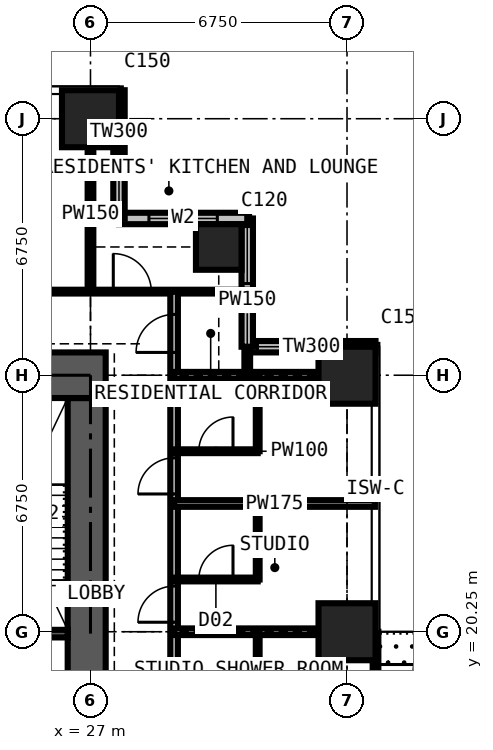
"""IFC4 building model, lengths in metres.
Left out: names, types, materials, properties, quantities, classifications, styles, units other than length and angle.
Written with IfcOpenShell. Run it as: python <this file> out.ifc"""

import sys

from ifc_helpers import new_model, si_unit, direction, frame, frame_2d, origin, origin_2d, place, context, subcontext, project, spatial, rectangle, extrude, element, fill, save


model = new_model("IFC4")
c1 = context("Model", 3, precision=1e-05, world=origin(), true_north=direction((0.0, 1.0)))
c2 = subcontext(c1, "Body", "Model", "MODEL_VIEW")
j1 = project(units=[si_unit("LENGTHUNIT", "METRE"), si_unit("PLANEANGLEUNIT", "RADIAN")], contexts=[c1])
p1 = place(None, origin())
s1 = spatial("IfcSite", under=j1, at=p1, CompositionType="ELEMENT")
p2 = place(p1, origin())
s2 = spatial("IfcBuilding", under=s1, at=p2, CompositionType="ELEMENT")
p3 = place(p2, frame((0.0, 0.0, 163.8)))
s3 = spatial("IfcBuildingStorey", under=s2, at=p3, CompositionType="ELEMENT", Elevation=163.8)
p4 = place(p3, frame((27.0, 33.75, 0.0), z_axis=(0.0, 0.0, 1.0), x_axis=(1.0, 0.0, 0.0)))
e1 = element("IfcColumn", 1, at=p4, inside=s3, PredefinedType="COLUMN", context=c2, shape_type="SweptSolid", body=[
    extrude(rectangle(XDim=1.5, YDim=1.5, at=origin_2d()), origin(), (0.0, 0.0, 1.0), 3.6),
])
p5 = place(p3, frame((30.375, 30.375, 0.0), z_axis=(0.0, 0.0, 1.0), x_axis=(1.0, 0.0, 0.0)))
e2 = element("IfcColumn", 2, at=p5, inside=s3, PredefinedType="COLUMN", context=c2, shape_type="SweptSolid", body=[
    extrude(rectangle(XDim=1.2, YDim=1.2, at=origin_2d()), origin(), (0.0, 0.0, 1.0), 3.6),
])
for number, where, z_axis, x_axis in (
    (3, (33.75, 20.25, 0.0), (0.0, 0.0, 1.0), (1.0, 0.0, 0.0)),
    (4, (33.75, 27.0, 0.0), (0.0, 0.0, 1.0), (1.0, 0.0, 0.0)),
):
    element("IfcColumn", number, at=place(p3, frame(where, z_axis=z_axis, x_axis=x_axis)), inside=s3, PredefinedType="COLUMN", context=c2, shape_type="SweptSolid", body=[
        extrude(rectangle(XDim=1.5, YDim=1.5, at=origin_2d()), origin(), (0.0, 0.0, 1.0), 3.6),
    ])
p6 = place(p3, frame((26.9, 14.1, 0.0), z_axis=(0.0, 0.0, 1.0), x_axis=(0.0, 1.0, 0.0)))
e5 = element("IfcWall", 5, at=p6, inside=s3, PredefinedType="SHEAR", context=c2, shape_type="SweptSolid", body=[
    extrude(rectangle(XDim=12.3, YDim=1.0, at=frame_2d((6.15, 0.0))), origin(), (0.0, 0.0, 1.0), 3.6),
])
p7 = place(p6, frame((3.65, 0.0, 0.0)))
e6 = element("IfcOpeningElement", 6, at=p7, cuts=e5, PredefinedType="OPENING", context=c2, shape_type="SweptSolid", body=[
    extrude(rectangle(XDim=1.2, YDim=2.2, at=frame_2d((0.6, 1.1))), frame((0.0, 0.51, 0.0), z_axis=(0.0, -1.0, 0.0), x_axis=(1.0, 0.0, 0.0)), (0.0, 0.0, 1.0), 1.02),
])
p8 = place(p3, frame((27.4, 27.0, 0.0), z_axis=(0.0, 0.0, 1.0), x_axis=(-1.0, 0.0, 0.0)))
e7 = element("IfcWall", 7, at=p8, inside=s3, PredefinedType="SHEAR", context=c2, shape_type="SweptSolid", body=[
    extrude(rectangle(XDim=14.3, YDim=1.2, at=frame_2d((7.15, 0.0))), origin(), (0.0, 0.0, 1.0), 3.6),
])
p9 = place(p8, frame((4.55, 0.0, 0.0)))
e8 = element("IfcOpeningElement", 8, at=p9, cuts=e7, PredefinedType="OPENING", context=c2, shape_type="SweptSolid", body=[
    extrude(rectangle(XDim=0.9, YDim=2.2, at=frame_2d((0.45, 1.1))), frame((0.0, 0.61, 0.0), z_axis=(0.0, -1.0, 0.0), x_axis=(1.0, 0.0, 0.0)), (0.0, 0.0, 1.0), 1.22),
])
p10 = place(p8, frame((7.525, 0.0, 0.0)))
e9 = element("IfcOpeningElement", 9, at=p10, cuts=e7, PredefinedType="OPENING", context=c2, shape_type="SweptSolid", body=[
    extrude(rectangle(XDim=1.0, YDim=2.2, at=frame_2d((0.5, 1.1))), frame((0.0, 0.61, 0.0), z_axis=(0.0, -1.0, 0.0), x_axis=(1.0, 0.0, 0.0)), (0.0, 0.0, 1.0), 1.22),
])
p11 = place(p3, frame((34.5, 20.25, 0.0), z_axis=(0.0, 0.0, 1.0), x_axis=(0.0, -1.0, 0.0)))
e10 = element("IfcWall", 10, at=p11, inside=s3, PredefinedType="SOLIDWALL", context=c2, shape_type="SweptSolid", body=[
    extrude(rectangle(XDim=6.75, YDim=0.15, at=frame_2d((3.375, 0.0))), origin(), (0.0, 0.0, 1.0), 3.375),
])
p12 = place(p11, frame((0.863, 0.0, 0.0)))
e11 = element("IfcOpeningElement", 11, at=p12, cuts=e10, PredefinedType="OPENING", context=c2, shape_type="SweptSolid", body=[
    extrude(rectangle(XDim=1.0, YDim=2.2, at=frame_2d((0.5, 1.1))), frame((0.0, 0.085, 0.0), z_axis=(0.0, -1.0, 0.0), x_axis=(1.0, 0.0, 0.0)), (0.0, 0.0, 1.0), 0.17),
])
p13 = place(p11, frame((1.975, 0.0, 0.9)))
e12 = element("IfcOpeningElement", 12, at=p13, cuts=e10, PredefinedType="OPENING", context=c2, shape_type="SweptSolid", body=[
    extrude(rectangle(XDim=1.2, YDim=1.8, at=frame_2d((0.6, 0.9))), frame((0.0, 0.085, 0.0), z_axis=(0.0, -1.0, 0.0), x_axis=(1.0, 0.0, 0.0)), (0.0, 0.0, 1.0), 0.17),
])
p14 = place(p11, frame((4.887, 0.0, 0.0)))
e13 = element("IfcOpeningElement", 13, at=p14, cuts=e10, PredefinedType="OPENING", context=c2, shape_type="SweptSolid", body=[
    extrude(rectangle(XDim=1.0, YDim=2.2, at=frame_2d((0.5, 1.1))), frame((0.0, 0.085, 0.0), z_axis=(0.0, -1.0, 0.0), x_axis=(1.0, 0.0, 0.0)), (0.0, 0.0, 1.0), 0.17),
])
p15 = place(p11, frame((3.575, 0.0, 0.9)))
e14 = element("IfcOpeningElement", 14, at=p15, cuts=e10, PredefinedType="OPENING", context=c2, shape_type="SweptSolid", body=[
    extrude(rectangle(XDim=1.2, YDim=1.8, at=frame_2d((0.6, 0.9))), frame((0.0, 0.085, 0.0), z_axis=(0.0, -1.0, 0.0), x_axis=(1.0, 0.0, 0.0)), (0.0, 0.0, 1.0), 0.17),
])
p16 = place(p3, frame((34.5, 27.75, 0.0), z_axis=(0.0, 0.0, 1.0), x_axis=(-1.0, 0.0, 0.0)))
e15 = element("IfcWall", 15, at=p16, inside=s3, PredefinedType="SOLIDWALL", context=c2, shape_type="SweptSolid", body=[
    extrude(rectangle(XDim=3.375, YDim=0.3, at=frame_2d((1.688, 0.0))), origin(), (0.0, 0.0, 1.0), 3.375),
])
p17 = place(p16, frame((1.607, 0.0, 0.9)))
e16 = element("IfcOpeningElement", 16, at=p17, cuts=e15, PredefinedType="OPENING", context=c2, shape_type="SweptSolid", body=[
    extrude(rectangle(XDim=1.5, YDim=1.8, at=frame_2d((0.75, 0.9))), frame((0.0, 0.16, 0.0), z_axis=(0.0, -1.0, 0.0), x_axis=(1.0, 0.0, 0.0)), (0.0, 0.0, 1.0), 0.32),
])
p18 = place(p3, frame((31.125, 27.75, 0.0), z_axis=(0.0, 0.0, 1.0), x_axis=(0.0, 1.0, 0.0)))
e17 = element("IfcWall", 17, at=p18, inside=s3, PredefinedType="SOLIDWALL", context=c2, shape_type="SweptSolid", body=[
    extrude(rectangle(XDim=3.375, YDim=0.3, at=frame_2d((1.688, 0.0))), origin(), (0.0, 0.0, 1.0), 3.375),
])
p19 = place(p18, frame((1.663, 0.0, 0.9)))
e18 = element("IfcOpeningElement", 18, at=p19, cuts=e17, PredefinedType="OPENING", context=c2, shape_type="SweptSolid", body=[
    extrude(rectangle(XDim=1.5, YDim=1.8, at=frame_2d((0.75, 0.9))), frame((0.0, 0.16, 0.0), z_axis=(0.0, -1.0, 0.0), x_axis=(1.0, 0.0, 0.0)), (0.0, 0.0, 1.0), 0.32),
])
p20 = place(p3, frame((31.125, 31.125, 0.0), z_axis=(0.0, 0.0, 1.0), x_axis=(-1.0, 0.0, 0.0)))
e19 = element("IfcWall", 19, at=p20, inside=s3, PredefinedType="SOLIDWALL", context=c2, shape_type="SweptSolid", body=[
    extrude(rectangle(XDim=3.375, YDim=0.3, at=frame_2d((1.688, 0.0))), origin(), (0.0, 0.0, 1.0), 3.375),
])
p21 = place(p20, frame((0.788, 0.0, 0.6)))
e20 = element("IfcOpeningElement", 20, at=p21, cuts=e19, PredefinedType="OPENING", context=c2, shape_type="SweptSolid", body=[
    extrude(rectangle(XDim=1.8, YDim=2.1, at=frame_2d((0.9, 1.05))), frame((0.0, 0.16, 0.0), z_axis=(0.0, -1.0, 0.0), x_axis=(1.0, 0.0, 0.0)), (0.0, 0.0, 1.0), 0.32),
])
p22 = place(p3, frame((27.75, 31.125, 0.0), z_axis=(0.0, 0.0, 1.0), x_axis=(0.0, 1.0, 0.0)))
e21 = element("IfcWall", 21, at=p22, inside=s3, PredefinedType="SOLIDWALL", context=c2, shape_type="SweptSolid", body=[
    extrude(rectangle(XDim=3.375, YDim=0.3, at=frame_2d((1.688, 0.0))), origin(), (0.0, 0.0, 1.0), 3.375),
])
p23 = place(p22, frame((0.268, 0.0, 0.9)))
e22 = element("IfcOpeningElement", 22, at=p23, cuts=e21, PredefinedType="OPENING", context=c2, shape_type="SweptSolid", body=[
    extrude(rectangle(XDim=1.5, YDim=1.8, at=frame_2d((0.75, 0.9))), frame((0.0, 0.16, 0.0), z_axis=(0.0, -1.0, 0.0), x_axis=(1.0, 0.0, 0.0)), (0.0, 0.0, 1.0), 0.32),
])
p24 = place(p3, frame((14.1, 20.2, 0.0), z_axis=(0.0, 0.0, 1.0), x_axis=(1.0, 0.0, 0.0)))
e23 = element("IfcWall", 23, at=p24, inside=s3, PredefinedType="SHEAR", context=c2, shape_type="SweptSolid", body=[
    extrude(rectangle(XDim=12.3, YDim=0.2, at=frame_2d((6.15, 0.0))), origin(), (0.0, 0.0, 1.0), 3.6),
])
p25 = place(p24, frame((4.56, 0.0, 0.0)))
e24 = element("IfcOpeningElement", 24, at=p25, cuts=e23, PredefinedType="OPENING", context=c2, shape_type="SweptSolid", body=[
    extrude(rectangle(XDim=1.1, YDim=2.2, at=frame_2d((0.55, 1.1))), frame((0.0, 0.11, 0.0), z_axis=(0.0, -1.0, 0.0), x_axis=(1.0, 0.0, 0.0)), (0.0, 0.0, 1.0), 0.22),
])
p26 = place(p24, frame((6.7, 0.0, 0.0)))
e25 = element("IfcOpeningElement", 25, at=p26, cuts=e23, PredefinedType="OPENING", context=c2, shape_type="SweptSolid", body=[
    extrude(rectangle(XDim=1.1, YDim=2.2, at=frame_2d((0.55, 1.1))), frame((0.0, 0.11, 0.0), z_axis=(0.0, -1.0, 0.0), x_axis=(1.0, 0.0, 0.0)), (0.0, 0.0, 1.0), 0.22),
])
p27 = place(p24, frame((0.35, 0.0, 0.0)))
e26 = element("IfcOpeningElement", 26, at=p27, cuts=e23, PredefinedType="OPENING", context=c2, shape_type="SweptSolid", body=[
    extrude(rectangle(XDim=1.1, YDim=2.2, at=frame_2d((0.55, 1.1))), frame((0.0, 0.11, 0.0), z_axis=(0.0, -1.0, 0.0), x_axis=(1.0, 0.0, 0.0)), (0.0, 0.0, 1.0), 0.22),
])
p28 = place(p24, frame((9.75, 0.0, 0.0)))
e27 = element("IfcOpeningElement", 27, at=p28, cuts=e23, PredefinedType="OPENING", context=c2, shape_type="SweptSolid", body=[
    extrude(rectangle(XDim=1.1, YDim=2.2, at=frame_2d((0.55, 1.1))), frame((0.0, 0.11, 0.0), z_axis=(0.0, -1.0, 0.0), x_axis=(1.0, 0.0, 0.0)), (0.0, 0.0, 1.0), 0.22),
])
p29 = place(p3, frame((11.3, 29.2, 0.0), z_axis=(0.0, 0.0, 1.0), x_axis=(1.0, 0.0, 0.0)))
e28 = element("IfcWall", 28, at=p29, inside=s3, PredefinedType="PARTITIONING", context=c2, shape_type="SweptSolid", body=[
    extrude(rectangle(XDim=19.809, YDim=0.1, at=frame_2d((9.904, 0.0))), origin(), (0.0, 0.0, 1.0), 3.375),
])
p30 = place(p29, frame((16.3, 0.0, 0.0)))
e29 = element("IfcOpeningElement", 29, at=p30, cuts=e28, PredefinedType="OPENING", context=c2, shape_type="SweptSolid", body=[
    extrude(rectangle(XDim=1.0, YDim=2.2, at=frame_2d((0.5, 1.1))), frame((0.0, 0.06, 0.0), z_axis=(0.0, -1.0, 0.0), x_axis=(1.0, 0.0, 0.0)), (0.0, 0.0, 1.0), 0.12),
])
p31 = place(p29, frame((6.4, 0.0, 0.0)))
e30 = element("IfcOpeningElement", 30, at=p31, cuts=e28, PredefinedType="OPENING", context=c2, shape_type="SweptSolid", body=[
    extrude(rectangle(XDim=0.95, YDim=2.2, at=frame_2d((0.475, 1.1))), frame((0.0, 0.06, 0.0), z_axis=(0.0, -1.0, 0.0), x_axis=(1.0, 0.0, 0.0)), (0.0, 0.0, 1.0), 0.12),
])
p32 = place(p29, frame((13.15, 0.0, 0.0)))
e31 = element("IfcOpeningElement", 31, at=p32, cuts=e28, PredefinedType="OPENING", context=c2, shape_type="SweptSolid", body=[
    extrude(rectangle(XDim=0.95, YDim=2.2, at=frame_2d((0.475, 1.1))), frame((0.0, 0.06, 0.0), z_axis=(0.0, -1.0, 0.0), x_axis=(1.0, 0.0, 0.0)), (0.0, 0.0, 1.0), 0.12),
])
p33 = place(p29, frame((0.6, 0.0, 0.0)))
e32 = element("IfcOpeningElement", 32, at=p33, cuts=e28, PredefinedType="OPENING", context=c2, shape_type="SweptSolid", body=[
    extrude(rectangle(XDim=1.0, YDim=2.2, at=frame_2d((0.5, 1.1))), frame((0.0, 0.06, 0.0), z_axis=(0.0, -1.0, 0.0), x_axis=(1.0, 0.0, 0.0)), (0.0, 0.0, 1.0), 0.12),
])
p34 = place(p3, frame((27.0, 29.2, 0.0), z_axis=(0.0, 0.0, 1.0), x_axis=(0.0, 1.0, 0.0)))
e33 = element("IfcWall", 33, at=p34, inside=s3, PredefinedType="PARTITIONING", context=c2, shape_type="SweptSolid", body=[
    extrude(rectangle(XDim=5.284, YDim=0.15, at=frame_2d((2.642, 0.0))), origin(), (0.0, 0.0, 1.0), 2.806),
])
p35 = place(p3, frame((29.2, 13.5, 0.0), z_axis=(0.0, 0.0, 1.0), x_axis=(0.0, 1.0, 0.0)))
e34 = element("IfcWall", 34, at=p35, inside=s3, PredefinedType="PARTITIONING", context=c2, shape_type="SweptSolid", body=[
    extrude(rectangle(XDim=15.7, YDim=0.2, at=frame_2d((7.85, 0.0))), origin(), (0.0, 0.0, 1.0), 3.375),
])
p36 = place(p35, frame((3.625, 0.0, 0.0)))
e35 = element("IfcOpeningElement", 35, at=p36, cuts=e34, PredefinedType="OPENING", context=c2, shape_type="SweptSolid", body=[
    extrude(rectangle(XDim=0.95, YDim=2.2, at=frame_2d((0.475, 1.1))), frame((0.0, 0.11, 0.0), z_axis=(0.0, -1.0, 0.0), x_axis=(1.0, 0.0, 0.0)), (0.0, 0.0, 1.0), 0.22),
])
p37 = place(p35, frame((7.0, 0.0, 0.0)))
e36 = element("IfcOpeningElement", 36, at=p37, cuts=e34, PredefinedType="OPENING", context=c2, shape_type="SweptSolid", body=[
    extrude(rectangle(XDim=0.95, YDim=2.2, at=frame_2d((0.475, 1.1))), frame((0.0, 0.11, 0.0), z_axis=(0.0, -1.0, 0.0), x_axis=(1.0, 0.0, 0.0)), (0.0, 0.0, 1.0), 0.22),
])
p38 = place(p35, frame((10.375, 0.0, 0.0)))
e37 = element("IfcOpeningElement", 37, at=p38, cuts=e34, PredefinedType="OPENING", context=c2, shape_type="SweptSolid", body=[
    extrude(rectangle(XDim=0.95, YDim=2.2, at=frame_2d((0.475, 1.1))), frame((0.0, 0.11, 0.0), z_axis=(0.0, -1.0, 0.0), x_axis=(1.0, 0.0, 0.0)), (0.0, 0.0, 1.0), 0.22),
])
p39 = place(p35, frame((14.1, 0.0, 0.0)))
e38 = element("IfcOpeningElement", 38, at=p39, cuts=e34, PredefinedType="OPENING", context=c2, shape_type="SweptSolid", body=[
    extrude(rectangle(XDim=1.0, YDim=2.2, at=frame_2d((0.5, 1.1))), frame((0.0, 0.11, 0.0), z_axis=(0.0, -1.0, 0.0), x_axis=(1.0, 0.0, 0.0)), (0.0, 0.0, 1.0), 0.22),
])
p40 = place(p3, frame((29.2, 20.25, 0.0), z_axis=(0.0, 0.0, 1.0), x_axis=(1.0, 0.0, 0.0)))
e39 = element("IfcWall", 39, at=p40, inside=s3, PredefinedType="PARTITIONING", context=c2, shape_type="SweptSolid", body=[
    extrude(rectangle(XDim=5.284, YDim=0.175, at=frame_2d((2.642, 0.0))), origin(), (0.0, 0.0, 1.0), 2.806),
])
p41 = place(p3, frame((29.2, 21.625, 0.0), z_axis=(0.0, 0.0, 1.0), x_axis=(1.0, 0.0, 0.0)))
e40 = element("IfcWall", 40, at=p41, inside=s3, PredefinedType="PARTITIONING", context=c2, shape_type="SweptSolid", body=[
    extrude(rectangle(XDim=2.2, YDim=0.1, at=frame_2d((1.1, 0.0))), origin(), (0.0, 0.0, 1.0), 3.375),
])
p42 = place(p41, frame((0.65, 0.0, 0.0)))
e41 = element("IfcOpeningElement", 41, at=p42, cuts=e40, PredefinedType="OPENING", context=c2, shape_type="SweptSolid", body=[
    extrude(rectangle(XDim=0.9, YDim=2.2, at=frame_2d((0.45, 1.1))), frame((0.0, 0.06, 0.0), z_axis=(0.0, -1.0, 0.0), x_axis=(1.0, 0.0, 0.0)), (0.0, 0.0, 1.0), 0.12),
])
p43 = place(p3, frame((29.2, 23.625, 0.0), z_axis=(0.0, 0.0, 1.0), x_axis=(1.0, 0.0, 0.0)))
e42 = element("IfcWall", 42, at=p43, inside=s3, PredefinedType="PARTITIONING", context=c2, shape_type="SweptSolid", body=[
    extrude(rectangle(XDim=5.284, YDim=0.175, at=frame_2d((2.642, 0.0))), origin(), (0.0, 0.0, 1.0), 3.375),
])
p44 = place(p3, frame((29.2, 25.0, 0.0), z_axis=(0.0, 0.0, 1.0), x_axis=(1.0, 0.0, 0.0)))
e43 = element("IfcWall", 43, at=p44, inside=s3, PredefinedType="PARTITIONING", context=c2, shape_type="SweptSolid", body=[
    extrude(rectangle(XDim=2.2, YDim=0.1, at=frame_2d((1.1, 0.0))), origin(), (0.0, 0.0, 1.0), 3.375),
])
p45 = place(p44, frame((0.65, 0.0, 0.0)))
e44 = element("IfcOpeningElement", 44, at=p45, cuts=e43, PredefinedType="OPENING", context=c2, shape_type="SweptSolid", body=[
    extrude(rectangle(XDim=0.9, YDim=2.2, at=frame_2d((0.45, 1.1))), frame((0.0, 0.06, 0.0), z_axis=(0.0, -1.0, 0.0), x_axis=(1.0, 0.0, 0.0)), (0.0, 0.0, 1.0), 0.12),
])
p46 = place(p3, frame((29.2, 27.0, 0.0), z_axis=(0.0, 0.0, 1.0), x_axis=(1.0, 0.0, 0.0)))
e45 = element("IfcWall", 45, at=p46, inside=s3, PredefinedType="PARTITIONING", context=c2, shape_type="SweptSolid", body=[
    extrude(rectangle(XDim=5.284, YDim=0.175, at=frame_2d((2.642, 0.0))), origin(), (0.0, 0.0, 1.0), 2.806),
])
p47 = place(p3, frame((31.125, 27.0, 0.0), z_axis=(0.0, 0.0, 1.0), x_axis=(0.0, 1.0, 0.0)))
e46 = element("IfcWall", 46, at=p47, inside=s3, PredefinedType="PARTITIONING", context=c2, shape_type="SweptSolid", body=[
    extrude(rectangle(XDim=0.734, YDim=0.15, at=frame_2d((0.367, 0.0))), origin(), (0.0, 0.0, 1.0), 3.375),
])
for number, where, z_axis, x_axis in (
    (47, (31.4, 18.25, 0.0), (0.0, 0.0, 1.0), (0.0, 1.0, 0.0)),
    (48, (31.4, 21.625, 0.0), (0.0, 0.0, 1.0), (0.0, 1.0, 0.0)),
    (49, (31.4, 25.0, 0.0), (0.0, 0.0, 1.0), (0.0, 1.0, 0.0)),
):
    element("IfcWall", number, at=place(p3, frame(where, z_axis=z_axis, x_axis=x_axis)), inside=s3, PredefinedType="PARTITIONING", context=c2, shape_type="SweptSolid", body=[
        extrude(rectangle(XDim=2.0, YDim=0.1, at=frame_2d((1.0, 0.0))), origin(), (0.0, 0.0, 1.0), 3.375),
    ])
p48 = place(p12, origin())
e50 = element("IfcDoor", 50, at=p48, inside=s3, OperationType="SINGLE_SWING_LEFT", PredefinedType="DOOR", context=c2, shape_type="SweptSolid", body=[
    extrude(rectangle(XDim=1.0, YDim=2.2, at=frame_2d((0.5, 1.1))), frame((0.0, 0.025, 0.0), z_axis=(0.0, -1.0, 0.0), x_axis=(1.0, 0.0, 0.0)), (0.0, 0.0, 1.0), 0.05),
])
fill(e11, e50)
p49 = place(p17, origin())
e51 = element("IfcWindow", 51, at=p49, inside=s3, PartitioningType="SINGLE_PANEL", PredefinedType="WINDOW", context=c2, shape_type="SweptSolid", body=[
    extrude(rectangle(XDim=1.5, YDim=1.8, at=frame_2d((0.75, 0.9))), frame((0.0, 0.03, 0.0), z_axis=(0.0, -1.0, 0.0), x_axis=(1.0, 0.0, 0.0)), (0.0, 0.0, 1.0), 0.06),
])
fill(e16, e51)
p50 = place(p19, origin())
e52 = element("IfcWindow", 52, at=p50, inside=s3, PartitioningType="SINGLE_PANEL", PredefinedType="WINDOW", context=c2, shape_type="SweptSolid", body=[
    extrude(rectangle(XDim=1.5, YDim=1.8, at=frame_2d((0.75, 0.9))), frame((0.0, 0.03, 0.0), z_axis=(0.0, -1.0, 0.0), x_axis=(1.0, 0.0, 0.0)), (0.0, 0.0, 1.0), 0.06),
])
fill(e18, e52)
p51 = place(p21, origin())
e53 = element("IfcWindow", 53, at=p51, inside=s3, PartitioningType="SINGLE_PANEL", PredefinedType="WINDOW", context=c2, shape_type="SweptSolid", body=[
    extrude(rectangle(XDim=1.8, YDim=2.1, at=frame_2d((0.9, 1.05))), frame((0.0, 0.03, 0.0), z_axis=(0.0, -1.0, 0.0), x_axis=(1.0, 0.0, 0.0)), (0.0, 0.0, 1.0), 0.06),
])
fill(e20, e53)
p52 = place(p23, origin())
e54 = element("IfcWindow", 54, at=p52, inside=s3, PartitioningType="SINGLE_PANEL", PredefinedType="WINDOW", context=c2, shape_type="SweptSolid", body=[
    extrude(rectangle(XDim=1.5, YDim=1.8, at=frame_2d((0.75, 0.9))), frame((0.0, 0.03, 0.0), z_axis=(0.0, -1.0, 0.0), x_axis=(1.0, 0.0, 0.0)), (0.0, 0.0, 1.0), 0.06),
])
fill(e22, e54)
p53 = place(p37, origin())
e55 = element("IfcDoor", 55, at=p53, inside=s3, OperationType="SINGLE_SWING_LEFT", PredefinedType="DOOR", context=c2, shape_type="SweptSolid", body=[
    extrude(rectangle(XDim=0.95, YDim=2.2, at=frame_2d((0.475, 1.1))), frame((0.0, 0.025, 0.0), z_axis=(0.0, -1.0, 0.0), x_axis=(1.0, 0.0, 0.0)), (0.0, 0.0, 1.0), 0.05),
])
fill(e36, e55)
p54 = place(p42, origin())
e56 = element("IfcDoor", 56, at=p54, inside=s3, OperationType="SINGLE_SWING_RIGHT", PredefinedType="DOOR", context=c2, shape_type="SweptSolid", body=[
    extrude(rectangle(XDim=0.9, YDim=2.2, at=frame_2d((0.45, 1.1))), frame((0.0, 0.025, 0.0), z_axis=(0.0, -1.0, 0.0), x_axis=(1.0, 0.0, 0.0)), (0.0, 0.0, 1.0), 0.05),
])
fill(e41, e56)
p55 = place(p38, origin())
e57 = element("IfcDoor", 57, at=p55, inside=s3, OperationType="SINGLE_SWING_LEFT", PredefinedType="DOOR", context=c2, shape_type="SweptSolid", body=[
    extrude(rectangle(XDim=0.95, YDim=2.2, at=frame_2d((0.475, 1.1))), frame((0.0, 0.025, 0.0), z_axis=(0.0, -1.0, 0.0), x_axis=(1.0, 0.0, 0.0)), (0.0, 0.0, 1.0), 0.05),
])
fill(e37, e57)
p56 = place(p45, origin())
e58 = element("IfcDoor", 58, at=p56, inside=s3, OperationType="SINGLE_SWING_RIGHT", PredefinedType="DOOR", context=c2, shape_type="SweptSolid", body=[
    extrude(rectangle(XDim=0.9, YDim=2.2, at=frame_2d((0.45, 1.1))), frame((0.0, 0.025, 0.0), z_axis=(0.0, -1.0, 0.0), x_axis=(1.0, 0.0, 0.0)), (0.0, 0.0, 1.0), 0.05),
])
fill(e44, e58)
p57 = place(p39, origin())
e59 = element("IfcDoor", 59, at=p57, inside=s3, OperationType="SINGLE_SWING_LEFT", PredefinedType="DOOR", context=c2, shape_type="SweptSolid", body=[
    extrude(rectangle(XDim=1.0, YDim=2.2, at=frame_2d((0.5, 1.1))), frame((0.0, 0.025, 0.0), z_axis=(0.0, -1.0, 0.0), x_axis=(1.0, 0.0, 0.0)), (0.0, 0.0, 1.0), 0.05),
])
fill(e38, e59)
p58 = place(p30, origin())
e60 = element("IfcDoor", 60, at=p58, inside=s3, OperationType="SINGLE_SWING_LEFT", PredefinedType="DOOR", context=c2, shape_type="SweptSolid", body=[
    extrude(rectangle(XDim=1.0, YDim=2.2, at=frame_2d((0.5, 1.1))), frame((0.0, 0.025, 0.0), z_axis=(0.0, -1.0, 0.0), x_axis=(1.0, 0.0, 0.0)), (0.0, 0.0, 1.0), 0.05),
])
fill(e29, e60)
save(model, sys.argv[1])
